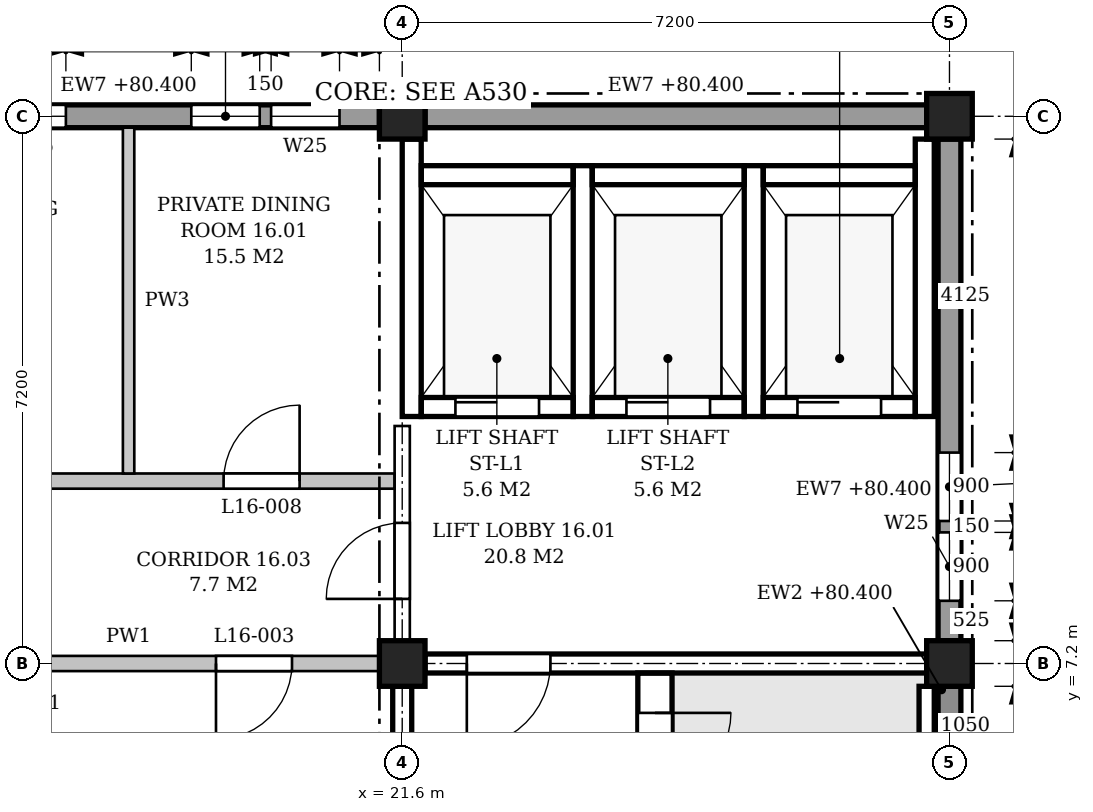
"""IFC4 building model, lengths in metres.
Left out: names, types, materials, properties, quantities, classifications, styles, units other than length and angle.
Written with IfcOpenShell. Run it as: python <this file> out.ifc"""

import sys

from ifc_helpers import new_model, si_unit, direction, frame, frame_2d, origin, origin_2d, place, context, subcontext, project, spatial, polyline, rectangle, outline, extrude, element, fill, save


model = new_model("IFC4")
c1 = context("Model", 3, precision=1e-05, world=origin(), true_north=direction((0.0, 1.0)))
c2 = subcontext(c1, "Body", "Model", "MODEL_VIEW")
j1 = project(units=[si_unit("LENGTHUNIT", "METRE"), si_unit("PLANEANGLEUNIT", "RADIAN")], contexts=[c1])
p1 = place(None, origin())
s1 = spatial("IfcSite", under=j1, at=p1, CompositionType="ELEMENT")
p2 = place(p1, origin())
s2 = spatial("IfcBuilding", under=s1, at=p2, CompositionType="ELEMENT")
p3 = place(p2, frame((0.0, 0.0, 76.8)))
s3 = spatial("IfcBuildingStorey", under=s2, at=p3, CompositionType="ELEMENT", Elevation=76.8)
for number, where, z_axis, x_axis in (
    (1, (21.6, 7.2, 0.0), (0.0, 0.0, 1.0), (1.0, 0.0, 0.0)),
    (2, (21.6, 14.4, 0.0), (0.0, 0.0, 1.0), (1.0, 0.0, 0.0)),
    (3, (28.8, 7.2, 0.0), (0.0, 0.0, 1.0), (1.0, 0.0, 0.0)),
    (4, (28.8, 14.4, 0.0), (0.0, 0.0, 1.0), (1.0, 0.0, 0.0)),
):
    element("IfcColumn", number, at=place(p3, frame(where, z_axis=z_axis, x_axis=x_axis)), inside=s3, PredefinedType="COLUMN", context=c2, shape_type="SweptSolid", body=[
        extrude(rectangle(XDim=0.6, YDim=0.6, at=origin_2d()), origin(), (0.0, 0.0, 1.0), 4.5),
    ])
p4 = place(p3, frame((28.8, 0.3, 0.0), z_axis=(0.0, 0.0, 1.0), x_axis=(0.0, 1.0, 0.0)))
e5 = element("IfcWall", 5, at=p4, inside=s3, PredefinedType="STANDARD", context=c2, shape_type="SweptSolid", body=[
    extrude(rectangle(XDim=6.6, YDim=0.3, at=frame_2d((3.3, 0.0))), origin(), (0.0, 0.0, 1.0), 3.6),
])
p5 = place(p4, frame((1.05, 0.0, 0.9)))
e6 = element("IfcOpeningElement", 6, at=p5, cuts=e5, PredefinedType="OPENING", context=c2, shape_type="SweptSolid", body=[
    extrude(outline(polyline([(0.0, 0.0), (0.9, 0.0), (0.9, 2.15), (0.45, 2.6), (0.0, 2.15), (0.0, 0.0)])), frame((0.0, 0.16, 0.0), z_axis=(0.0, -1.0, 0.0), x_axis=(1.0, 0.0, 0.0)), (0.0, 0.0, 1.0), 0.32),
])
p6 = place(p4, frame((4.65, 0.0, 0.9)))
e7 = element("IfcOpeningElement", 7, at=p6, cuts=e5, PredefinedType="OPENING", context=c2, shape_type="SweptSolid", body=[
    extrude(outline(polyline([(0.0, 0.0), (0.9, 0.0), (0.9, 2.15), (0.45, 2.6), (0.0, 2.15), (0.0, 0.0)])), frame((0.0, 0.16, 0.0), z_axis=(0.0, -1.0, 0.0), x_axis=(1.0, 0.0, 0.0)), (0.0, 0.0, 1.0), 0.32),
])
p7 = place(p3, frame((28.8, 7.5, 0.0), z_axis=(0.0, 0.0, 1.0), x_axis=(0.0, 1.0, 0.0)))
e8 = element("IfcWall", 8, at=p7, inside=s3, PredefinedType="STANDARD", context=c2, shape_type="SweptSolid", body=[
    extrude(rectangle(XDim=6.6, YDim=0.3, at=frame_2d((3.3, 0.0))), origin(), (0.0, 0.0, 1.0), 3.6),
])
p8 = place(p7, frame((0.525, 0.0, 0.9)))
e9 = element("IfcOpeningElement", 9, at=p8, cuts=e8, PredefinedType="OPENING", context=c2, shape_type="SweptSolid", body=[
    extrude(outline(polyline([(0.0, 0.0), (0.9, 0.0), (0.9, 2.15), (0.45, 2.6), (0.0, 2.15), (0.0, 0.0)])), frame((0.0, 0.16, 0.0), z_axis=(0.0, -1.0, 0.0), x_axis=(1.0, 0.0, 0.0)), (0.0, 0.0, 1.0), 0.32),
])
p9 = place(p7, frame((1.575, 0.0, 0.9)))
e10 = element("IfcOpeningElement", 10, at=p9, cuts=e8, PredefinedType="OPENING", context=c2, shape_type="SweptSolid", body=[
    extrude(outline(polyline([(0.0, 0.0), (0.9, 0.0), (0.9, 2.15), (0.45, 2.6), (0.0, 2.15), (0.0, 0.0)])), frame((0.0, 0.16, 0.0), z_axis=(0.0, -1.0, 0.0), x_axis=(1.0, 0.0, 0.0)), (0.0, 0.0, 1.0), 0.32),
])
p10 = place(p3, frame((28.5, 14.4, 0.0), z_axis=(0.0, 0.0, 1.0), x_axis=(-1.0, 0.0, 0.0)))
e11 = element("IfcWall", 11, at=p10, inside=s3, PredefinedType="STANDARD", context=c2, shape_type="SweptSolid", body=[
    extrude(rectangle(XDim=6.6, YDim=0.3, at=frame_2d((3.3, 0.0))), origin(), (0.0, 0.0, 1.0), 3.6),
])
p11 = place(p3, frame((21.3, 14.4, 0.0), z_axis=(0.0, 0.0, 1.0), x_axis=(-1.0, 0.0, 0.0)))
e12 = element("IfcWall", 12, at=p11, inside=s3, PredefinedType="STANDARD", context=c2, shape_type="SweptSolid", body=[
    extrude(rectangle(XDim=6.6, YDim=0.3, at=frame_2d((3.3, 0.0))), origin(), (0.0, 0.0, 1.0), 3.6),
])
p12 = place(p11, frame((0.525, 0.0, 0.9)))
e13 = element("IfcOpeningElement", 13, at=p12, cuts=e12, PredefinedType="OPENING", context=c2, shape_type="SweptSolid", body=[
    extrude(outline(polyline([(0.0, 0.0), (0.9, 0.0), (0.9, 2.15), (0.45, 2.6), (0.0, 2.15), (0.0, 0.0)])), frame((0.0, 0.16, 0.0), z_axis=(0.0, -1.0, 0.0), x_axis=(1.0, 0.0, 0.0)), (0.0, 0.0, 1.0), 0.32),
])
p13 = place(p11, frame((1.575, 0.0, 0.9)))
e14 = element("IfcOpeningElement", 14, at=p13, cuts=e12, PredefinedType="OPENING", context=c2, shape_type="SweptSolid", body=[
    extrude(outline(polyline([(0.0, 0.0), (0.9, 0.0), (0.9, 2.15), (0.45, 2.6), (0.0, 2.15), (0.0, 0.0)])), frame((0.0, 0.16, 0.0), z_axis=(0.0, -1.0, 0.0), x_axis=(1.0, 0.0, 0.0)), (0.0, 0.0, 1.0), 0.32),
])
p14 = place(p11, frame((4.125, 0.0, 0.9)))
e15 = element("IfcOpeningElement", 15, at=p14, cuts=e12, PredefinedType="OPENING", context=c2, shape_type="SweptSolid", body=[
    extrude(outline(polyline([(0.0, 0.0), (0.9, 0.0), (0.9, 2.15), (0.45, 2.6), (0.0, 2.15), (0.0, 0.0)])), frame((0.0, 0.16, 0.0), z_axis=(0.0, -1.0, 0.0), x_axis=(1.0, 0.0, 0.0)), (0.0, 0.0, 1.0), 0.32),
])
p15 = place(p11, frame((5.175, 0.0, 0.9)))
e16 = element("IfcOpeningElement", 16, at=p15, cuts=e12, PredefinedType="OPENING", context=c2, shape_type="SweptSolid", body=[
    extrude(outline(polyline([(0.0, 0.0), (0.9, 0.0), (0.9, 2.15), (0.45, 2.6), (0.0, 2.15), (0.0, 0.0)])), frame((0.0, 0.16, 0.0), z_axis=(0.0, -1.0, 0.0), x_axis=(1.0, 0.0, 0.0)), (0.0, 0.0, 1.0), 0.32),
])
p16 = place(p3, frame((21.9, 7.2, 0.0), z_axis=(0.0, 0.0, 1.0), x_axis=(1.0, 0.0, 0.0)))
e17 = element("IfcWall", 17, at=p16, inside=s3, PredefinedType="SHEAR", context=c2, shape_type="SweptSolid", body=[
    extrude(rectangle(XDim=6.6, YDim=0.25, at=frame_2d((3.3, 0.0))), origin(), (0.0, 0.0, 1.0), 3.55),
])
p17 = place(p16, frame((0.55, 0.0, 0.0)))
e18 = element("IfcOpeningElement", 18, at=p17, cuts=e17, PredefinedType="OPENING", context=c2, shape_type="SweptSolid", body=[
    extrude(rectangle(XDim=1.1, YDim=2.1, at=frame_2d((0.55, 1.05))), frame((0.0, 0.135, 0.0), z_axis=(0.0, -1.0, 0.0), x_axis=(1.0, 0.0, 0.0)), (0.0, 0.0, 1.0), 0.27),
])
p18 = place(p3, frame((21.6, 0.3, 0.0), z_axis=(0.0, 0.0, 1.0), x_axis=(0.0, 1.0, 0.0)))
e19 = element("IfcWall", 19, at=p18, inside=s3, PredefinedType="SHEAR", context=c2, shape_type="SweptSolid", body=[
    extrude(rectangle(XDim=6.6, YDim=0.25, at=frame_2d((3.3, 0.0))), origin(), (0.0, 0.0, 1.0), 3.55),
])
p19 = place(p3, frame((28.5, 5.85, -0.25), z_axis=(0.0, 0.0, 1.0), x_axis=(0.0, 1.0, 0.0)))
e20 = element("IfcWall", 20, at=p19, inside=s3, PredefinedType="SHEAR", context=c2, shape_type="SweptSolid", body=[
    extrude(rectangle(XDim=1.05, YDim=0.2, at=frame_2d((0.525, 0.0))), origin(), (0.0, 0.0, 1.0), 4.45),
])
p20 = place(p3, frame((24.925, 0.15, 0.0), z_axis=(0.0, 0.0, 1.0), x_axis=(0.0, 1.0, 0.0)))
e21 = element("IfcWall", 21, at=p20, inside=s3, PredefinedType="SHEAR", context=c2, shape_type="SweptSolid", body=[
    extrude(rectangle(XDim=6.925, YDim=0.45, at=frame_2d((3.462, 0.0))), origin(), (0.0, 0.0, 1.0), 4.2),
])
p21 = place(p20, frame((5.4, 0.0, 0.0)))
e22 = element("IfcOpeningElement", 22, at=p21, cuts=e21, PredefinedType="OPENING", context=c2, shape_type="SweptSolid", body=[
    extrude(rectangle(XDim=1.0, YDim=2.1, at=frame_2d((0.5, 1.05))), frame((0.0, 0.235, 0.0), z_axis=(0.0, -1.0, 0.0), x_axis=(1.0, 0.0, 0.0)), (0.0, 0.0, 1.0), 0.47),
])
p22 = place(p3, frame((21.725, 10.45, -0.25), z_axis=(0.0, 0.0, 1.0), x_axis=(0.0, 1.0, 0.0)))
e23 = element("IfcWall", 23, at=p22, inside=s3, PredefinedType="SHEAR", context=c2, shape_type="SweptSolid", body=[
    extrude(rectangle(XDim=3.65, YDim=0.25, at=frame_2d((1.825, 0.0))), origin(), (0.0, 0.0, 1.0), 3.8),
])
for number, where, z_axis, x_axis in (
    (24, (23.975, 10.45, -0.25), (0.0, 0.0, 1.0), (0.0, 1.0, 0.0)),
    (25, (26.225, 10.45, -0.25), (0.0, 0.0, 1.0), (0.0, 1.0, 0.0)),
):
    element("IfcWall", number, at=place(p3, frame(where, z_axis=z_axis, x_axis=x_axis)), inside=s3, PredefinedType="SHEAR", context=c2, shape_type="SweptSolid", body=[
        extrude(rectangle(XDim=3.3, YDim=0.25, at=frame_2d((1.65, 0.0))), origin(), (0.0, 0.0, 1.0), 4.45),
    ])
p23 = place(p3, frame((28.475, 10.45, -0.25), z_axis=(0.0, 0.0, 1.0), x_axis=(0.0, 1.0, 0.0)))
e26 = element("IfcWall", 26, at=p23, inside=s3, PredefinedType="SHEAR", context=c2, shape_type="SweptSolid", body=[
    extrude(rectangle(XDim=3.65, YDim=0.25, at=frame_2d((1.825, 0.0))), origin(), (0.0, 0.0, 1.0), 4.45),
])
p24 = place(p3, frame((21.85, 10.575, -0.25), z_axis=(0.0, 0.0, 1.0), x_axis=(1.0, 0.0, 0.0)))
e27 = element("IfcWall", 27, at=p24, inside=s3, PredefinedType="SHEAR", context=c2, shape_type="SweptSolid", body=[
    extrude(rectangle(XDim=2.0, YDim=0.25, at=frame_2d((1.0, 0.0))), origin(), (0.0, 0.0, 1.0), 4.45),
])
p25 = place(p24, frame((0.45, 0.0, 0.25)))
e28 = element("IfcOpeningElement", 28, at=p25, cuts=e27, PredefinedType="OPENING", context=c2, shape_type="SweptSolid", body=[
    extrude(rectangle(XDim=1.1, YDim=2.1, at=frame_2d((0.55, 1.05))), frame((0.0, 0.135, 0.0), z_axis=(0.0, -1.0, 0.0), x_axis=(1.0, 0.0, 0.0)), (0.0, 0.0, 1.0), 0.27),
])
p26 = place(p3, frame((21.85, 13.625, -0.25), z_axis=(0.0, 0.0, 1.0), x_axis=(1.0, 0.0, 0.0)))
e29 = element("IfcWall", 29, at=p26, inside=s3, PredefinedType="SHEAR", context=c2, shape_type="SweptSolid", body=[
    extrude(rectangle(XDim=2.0, YDim=0.25, at=frame_2d((1.0, 0.0))), origin(), (0.0, 0.0, 1.0), 4.45),
])
p27 = place(p3, frame((24.1, 10.575, -0.25), z_axis=(0.0, 0.0, 1.0), x_axis=(1.0, 0.0, 0.0)))
e30 = element("IfcWall", 30, at=p27, inside=s3, PredefinedType="SHEAR", context=c2, shape_type="SweptSolid", body=[
    extrude(rectangle(XDim=2.0, YDim=0.25, at=frame_2d((1.0, 0.0))), origin(), (0.0, 0.0, 1.0), 4.45),
])
p28 = place(p27, frame((0.45, 0.0, 0.25)))
e31 = element("IfcOpeningElement", 31, at=p28, cuts=e30, PredefinedType="OPENING", context=c2, shape_type="SweptSolid", body=[
    extrude(rectangle(XDim=1.1, YDim=2.1, at=frame_2d((0.55, 1.05))), frame((0.0, 0.135, 0.0), z_axis=(0.0, -1.0, 0.0), x_axis=(1.0, 0.0, 0.0)), (0.0, 0.0, 1.0), 0.27),
])
p29 = place(p3, frame((24.1, 13.625, -0.25), z_axis=(0.0, 0.0, 1.0), x_axis=(1.0, 0.0, 0.0)))
e32 = element("IfcWall", 32, at=p29, inside=s3, PredefinedType="SHEAR", context=c2, shape_type="SweptSolid", body=[
    extrude(rectangle(XDim=2.0, YDim=0.25, at=frame_2d((1.0, 0.0))), origin(), (0.0, 0.0, 1.0), 4.45),
])
p30 = place(p3, frame((26.35, 10.575, -0.25), z_axis=(0.0, 0.0, 1.0), x_axis=(1.0, 0.0, 0.0)))
e33 = element("IfcWall", 33, at=p30, inside=s3, PredefinedType="SHEAR", context=c2, shape_type="SweptSolid", body=[
    extrude(rectangle(XDim=2.0, YDim=0.25, at=frame_2d((1.0, 0.0))), origin(), (0.0, 0.0, 1.0), 4.45),
])
p31 = place(p30, frame((0.45, 0.0, 0.25)))
e34 = element("IfcOpeningElement", 34, at=p31, cuts=e33, PredefinedType="OPENING", context=c2, shape_type="SweptSolid", body=[
    extrude(rectangle(XDim=1.1, YDim=2.1, at=frame_2d((0.55, 1.05))), frame((0.0, 0.135, 0.0), z_axis=(0.0, -1.0, 0.0), x_axis=(1.0, 0.0, 0.0)), (0.0, 0.0, 1.0), 0.27),
])
p32 = place(p3, frame((26.35, 13.625, -0.25), z_axis=(0.0, 0.0, 1.0), x_axis=(1.0, 0.0, 0.0)))
e35 = element("IfcWall", 35, at=p32, inside=s3, PredefinedType="SHEAR", context=c2, shape_type="SweptSolid", body=[
    extrude(rectangle(XDim=2.0, YDim=0.25, at=frame_2d((1.0, 0.0))), origin(), (0.0, 0.0, 1.0), 4.45),
])
p33 = place(p3, frame((14.7, 7.2, 0.0), z_axis=(0.0, 0.0, 1.0), x_axis=(1.0, 0.0, 0.0)))
e36 = element("IfcWall", 36, at=p33, inside=s3, PredefinedType="PARTITIONING", context=c2, shape_type="SweptSolid", body=[
    extrude(rectangle(XDim=6.6, YDim=0.2, at=frame_2d((3.3, 0.0))), origin(), (0.0, 0.0, 1.0), 3.55),
])
p34 = place(p33, frame((4.45, 0.0, 0.0)))
e37 = element("IfcOpeningElement", 37, at=p34, cuts=e36, PredefinedType="OPENING", context=c2, shape_type="SweptSolid", body=[
    extrude(rectangle(XDim=1.0, YDim=2.1, at=frame_2d((0.5, 1.05))), frame((0.0, 0.11, 0.0), z_axis=(0.0, -1.0, 0.0), x_axis=(1.0, 0.0, 0.0)), (0.0, 0.0, 1.0), 0.22),
])
p35 = place(p3, frame((3.5, 9.6, 0.0), z_axis=(0.0, 0.0, 1.0), x_axis=(1.0, 0.0, 0.0)))
e38 = element("IfcWall", 38, at=p35, inside=s3, PredefinedType="PARTITIONING", context=c2, shape_type="SweptSolid", body=[
    extrude(outline(polyline([(0.0, 0.0), (18.0, 0.0), (18.0, 3.55), (17.875, 3.55), (17.875, 4.2), (11.125, 4.2), (11.125, 3.55), (10.675, 3.55), (10.675, 4.2), (3.925, 4.2), (3.925, 3.55), (3.475, 3.55), (3.475, 4.2), (0.0, 4.2), (0.0, 0.0)])), frame((0.0, 0.1, 0.0), z_axis=(0.0, -1.0, 0.0), x_axis=(1.0, 0.0, 0.0)), (0.0, 0.0, 1.0), 0.2),
])
p36 = place(p35, frame((15.75, 0.0, 0.0)))
e39 = element("IfcOpeningElement", 39, at=p36, cuts=e38, PredefinedType="OPENING", context=c2, shape_type="SweptSolid", body=[
    extrude(rectangle(XDim=1.0, YDim=2.1, at=frame_2d((0.5, 1.05))), frame((0.0, 0.11, 0.0), z_axis=(0.0, -1.0, 0.0), x_axis=(1.0, 0.0, 0.0)), (0.0, 0.0, 1.0), 0.22),
])
p37 = place(p35, frame((0.9, 0.0, 0.0)))
e40 = element("IfcOpeningElement", 40, at=p37, cuts=e38, PredefinedType="OPENING", context=c2, shape_type="SweptSolid", body=[
    extrude(rectangle(XDim=2.0, YDim=2.1, at=frame_2d((1.0, 1.05))), frame((0.0, 0.11, 0.0), z_axis=(0.0, -1.0, 0.0), x_axis=(1.0, 0.0, 0.0)), (0.0, 0.0, 1.0), 0.22),
])
p38 = place(p35, frame((6.3, 0.0, 0.0)))
e41 = element("IfcOpeningElement", 41, at=p38, cuts=e38, PredefinedType="OPENING", context=c2, shape_type="SweptSolid", body=[
    extrude(rectangle(XDim=2.0, YDim=2.1, at=frame_2d((1.0, 1.05))), frame((0.0, 0.11, 0.0), z_axis=(0.0, -1.0, 0.0), x_axis=(1.0, 0.0, 0.0)), (0.0, 0.0, 1.0), 0.22),
])
p39 = place(p35, frame((12.2, 0.0, 0.0)))
e42 = element("IfcOpeningElement", 42, at=p39, cuts=e38, PredefinedType="OPENING", context=c2, shape_type="SweptSolid", body=[
    extrude(rectangle(XDim=1.0, YDim=2.1, at=frame_2d((0.5, 1.05))), frame((0.0, 0.11, 0.0), z_axis=(0.0, -1.0, 0.0), x_axis=(1.0, 0.0, 0.0)), (0.0, 0.0, 1.0), 0.22),
])
p40 = place(p3, frame((18.0, 9.7, 0.0), z_axis=(0.0, 0.0, 1.0), x_axis=(0.0, 1.0, 0.0)))
e43 = element("IfcWall", 43, at=p40, inside=s3, PredefinedType="PARTITIONING", context=c2, shape_type="SweptSolid", body=[
    extrude(rectangle(XDim=4.55, YDim=0.15, at=frame_2d((2.275, 0.0))), origin(), (0.0, 0.0, 1.0), 3.55),
])
p41 = place(p3, frame((21.6, 7.5, 0.0), z_axis=(0.0, 0.0, 1.0), x_axis=(0.0, 1.0, 0.0)))
e44 = element("IfcWall", 44, at=p41, inside=s3, PredefinedType="PARTITIONING", context=c2, shape_type="SweptSolid", body=[
    extrude(rectangle(XDim=2.825, YDim=0.2, at=frame_2d((1.413, 0.0))), origin(), (0.0, 0.0, 1.0), 3.55),
])
p42 = place(p41, frame((0.55, 0.0, 0.0)))
e45 = element("IfcOpeningElement", 45, at=p42, cuts=e44, PredefinedType="OPENING", context=c2, shape_type="SweptSolid", body=[
    extrude(rectangle(XDim=1.0, YDim=2.1, at=frame_2d((0.5, 1.05))), frame((0.0, 0.11, 0.0), z_axis=(0.0, -1.0, 0.0), x_axis=(1.0, 0.0, 0.0)), (0.0, 0.0, 1.0), 0.22),
])
p43 = place(p8, origin())
e46 = element("IfcWindow", 46, at=p43, inside=s3, PartitioningType="SINGLE_PANEL", PredefinedType="WINDOW", context=c2, shape_type="SweptSolid", body=[
    extrude(outline(polyline([(0.0, 0.0), (0.9, 0.0), (0.9, 2.15), (0.45, 2.6), (0.0, 2.15), (0.0, 0.0)])), frame((0.0, 0.03, 0.0), z_axis=(0.0, -1.0, 0.0), x_axis=(1.0, 0.0, 0.0)), (0.0, 0.0, 1.0), 0.06),
])
fill(e9, e46)
p44 = place(p9, origin())
e47 = element("IfcWindow", 47, at=p44, inside=s3, PartitioningType="SINGLE_PANEL", PredefinedType="WINDOW", context=c2, shape_type="SweptSolid", body=[
    extrude(outline(polyline([(0.0, 0.0), (0.9, 0.0), (0.9, 2.15), (0.45, 2.6), (0.0, 2.15), (0.0, 0.0)])), frame((0.0, 0.03, 0.0), z_axis=(0.0, -1.0, 0.0), x_axis=(1.0, 0.0, 0.0)), (0.0, 0.0, 1.0), 0.06),
])
fill(e10, e47)
p45 = place(p12, origin())
e48 = element("IfcWindow", 48, at=p45, inside=s3, PartitioningType="SINGLE_PANEL", PredefinedType="WINDOW", context=c2, shape_type="SweptSolid", body=[
    extrude(outline(polyline([(0.0, 0.0), (0.9, 0.0), (0.9, 2.15), (0.45, 2.6), (0.0, 2.15), (0.0, 0.0)])), frame((0.0, 0.03, 0.0), z_axis=(0.0, -1.0, 0.0), x_axis=(1.0, 0.0, 0.0)), (0.0, 0.0, 1.0), 0.06),
])
fill(e13, e48)
p46 = place(p13, origin())
e49 = element("IfcWindow", 49, at=p46, inside=s3, PartitioningType="SINGLE_PANEL", PredefinedType="WINDOW", context=c2, shape_type="SweptSolid", body=[
    extrude(outline(polyline([(0.0, 0.0), (0.9, 0.0), (0.9, 2.15), (0.45, 2.6), (0.0, 2.15), (0.0, 0.0)])), frame((0.0, 0.03, 0.0), z_axis=(0.0, -1.0, 0.0), x_axis=(1.0, 0.0, 0.0)), (0.0, 0.0, 1.0), 0.06),
])
fill(e14, e49)
p47 = place(p14, origin())
e50 = element("IfcWindow", 50, at=p47, inside=s3, PartitioningType="SINGLE_PANEL", PredefinedType="WINDOW", context=c2, shape_type="SweptSolid", body=[
    extrude(outline(polyline([(0.0, 0.0), (0.9, 0.0), (0.9, 2.15), (0.45, 2.6), (0.0, 2.15), (0.0, 0.0)])), frame((0.0, 0.03, 0.0), z_axis=(0.0, -1.0, 0.0), x_axis=(1.0, 0.0, 0.0)), (0.0, 0.0, 1.0), 0.06),
])
fill(e15, e50)
p48 = place(p21, frame((1.0, 0.0, 0.0), z_axis=(0.0, 0.0, 1.0), x_axis=(-1.0, 0.0, 0.0)))
e51 = element("IfcDoor", 51, at=p48, inside=s3, OperationType="SINGLE_SWING_LEFT", PredefinedType="DOOR", context=c2, shape_type="SweptSolid", body=[
    extrude(rectangle(XDim=1.0, YDim=2.1, at=frame_2d((0.5, 1.05))), frame((0.0, 0.025, 0.0), z_axis=(0.0, -1.0, 0.0), x_axis=(1.0, 0.0, 0.0)), (0.0, 0.0, 1.0), 0.05),
])
fill(e22, e51)
p49 = place(p17, frame((1.1, 0.0, 0.0), z_axis=(0.0, 0.0, 1.0), x_axis=(-1.0, 0.0, 0.0)))
e52 = element("IfcDoor", 52, at=p49, inside=s3, OperationType="SINGLE_SWING_RIGHT", PredefinedType="DOOR", context=c2, shape_type="SweptSolid", body=[
    extrude(rectangle(XDim=1.1, YDim=2.1, at=frame_2d((0.55, 1.05))), frame((0.0, 0.025, 0.0), z_axis=(0.0, -1.0, 0.0), x_axis=(1.0, 0.0, 0.0)), (0.0, 0.0, 1.0), 0.05),
])
fill(e18, e52)
p50 = place(p25, origin())
e53 = element("IfcDoor", 53, at=p50, inside=s3, OperationType="SLIDING_TO_LEFT", PredefinedType="DOOR", context=c2, shape_type="SweptSolid", body=[
    extrude(rectangle(XDim=1.1, YDim=2.1, at=frame_2d((0.55, 1.05))), frame((0.0, 0.025, 0.0), z_axis=(0.0, -1.0, 0.0), x_axis=(1.0, 0.0, 0.0)), (0.0, 0.0, 1.0), 0.05),
])
fill(e28, e53)
p51 = place(p28, origin())
e54 = element("IfcDoor", 54, at=p51, inside=s3, OperationType="SLIDING_TO_LEFT", PredefinedType="DOOR", context=c2, shape_type="SweptSolid", body=[
    extrude(rectangle(XDim=1.1, YDim=2.1, at=frame_2d((0.55, 1.05))), frame((0.0, 0.025, 0.0), z_axis=(0.0, -1.0, 0.0), x_axis=(1.0, 0.0, 0.0)), (0.0, 0.0, 1.0), 0.05),
])
fill(e31, e54)
p52 = place(p31, origin())
e55 = element("IfcDoor", 55, at=p52, inside=s3, OperationType="SLIDING_TO_LEFT", PredefinedType="DOOR", context=c2, shape_type="SweptSolid", body=[
    extrude(rectangle(XDim=1.1, YDim=2.1, at=frame_2d((0.55, 1.05))), frame((0.0, 0.025, 0.0), z_axis=(0.0, -1.0, 0.0), x_axis=(1.0, 0.0, 0.0)), (0.0, 0.0, 1.0), 0.05),
])
fill(e34, e55)
p53 = place(p42, origin())
e56 = element("IfcDoor", 56, at=p53, inside=s3, OperationType="SINGLE_SWING_LEFT", PredefinedType="DOOR", context=c2, shape_type="SweptSolid", body=[
    extrude(rectangle(XDim=1.0, YDim=2.1, at=frame_2d((0.5, 1.05))), frame((0.0, 0.025, 0.0), z_axis=(0.0, -1.0, 0.0), x_axis=(1.0, 0.0, 0.0)), (0.0, 0.0, 1.0), 0.05),
])
fill(e45, e56)
p54 = place(p34, frame((1.0, 0.0, 0.0), z_axis=(0.0, 0.0, 1.0), x_axis=(-1.0, 0.0, 0.0)))
e57 = element("IfcDoor", 57, at=p54, inside=s3, OperationType="SINGLE_SWING_RIGHT", PredefinedType="DOOR", context=c2, shape_type="SweptSolid", body=[
    extrude(rectangle(XDim=1.0, YDim=2.1, at=frame_2d((0.5, 1.05))), frame((0.0, 0.025, 0.0), z_axis=(0.0, -1.0, 0.0), x_axis=(1.0, 0.0, 0.0)), (0.0, 0.0, 1.0), 0.05),
])
fill(e37, e57)
p55 = place(p36, origin())
e58 = element("IfcDoor", 58, at=p55, inside=s3, OperationType="SINGLE_SWING_RIGHT", PredefinedType="DOOR", context=c2, shape_type="SweptSolid", body=[
    extrude(rectangle(XDim=1.0, YDim=2.1, at=frame_2d((0.5, 1.05))), frame((0.0, 0.025, 0.0), z_axis=(0.0, -1.0, 0.0), x_axis=(1.0, 0.0, 0.0)), (0.0, 0.0, 1.0), 0.05),
])
fill(e39, e58)
save(model, sys.argv[1])
